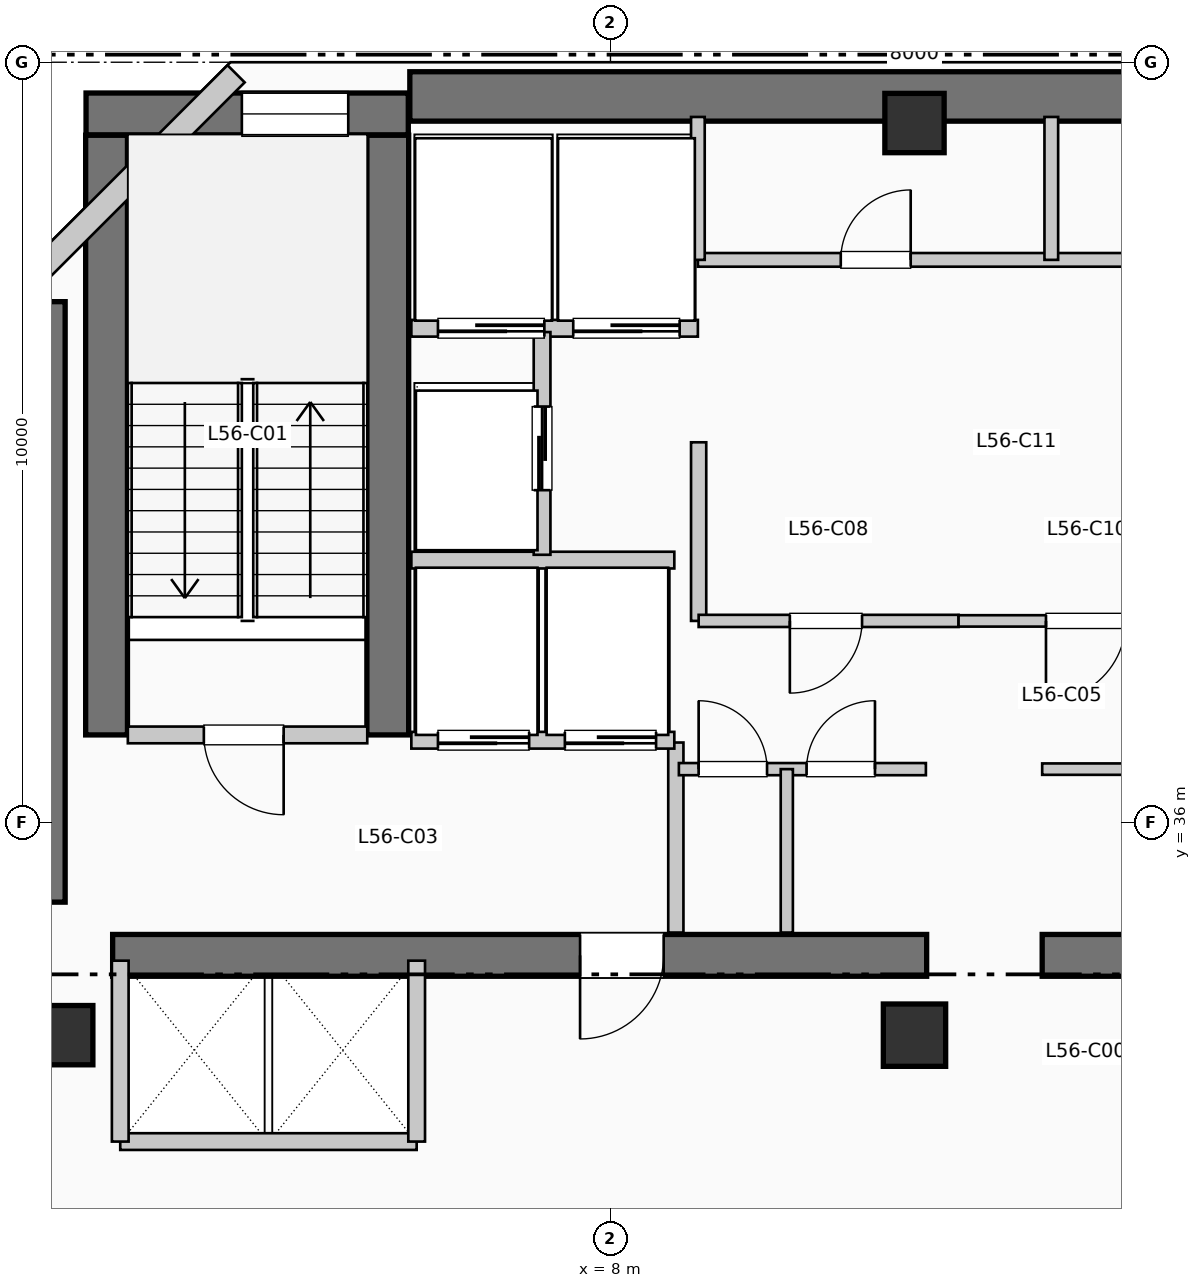
"""IFC4 building model, lengths in metres.
Left out: names, types, materials, properties, quantities, classifications, styles, units other than length and angle.
Written with IfcOpenShell. Run it as: python <this file> out.ifc"""

import sys

from ifc_helpers import new_model, si_unit, direction, frame, frame_2d, origin, origin_2d, place, context, subcontext, project, spatial, rectangle, extrude, element, fill, save


model = new_model("IFC4")
c1 = context("Model", 3, precision=1e-05, world=origin(), true_north=direction((0.0, 1.0)))
c2 = subcontext(c1, "Body", "Model", "MODEL_VIEW")
j1 = project(units=[si_unit("LENGTHUNIT", "METRE"), si_unit("PLANEANGLEUNIT", "RADIAN")], contexts=[c1])
p1 = place(None, origin())
s1 = spatial("IfcSite", under=j1, at=p1, CompositionType="ELEMENT")
p2 = place(p1, origin())
s2 = spatial("IfcBuilding", under=s1, at=p2, CompositionType="ELEMENT")
p3 = place(p2, frame((0.0, 0.0, 231.66)))
s3 = spatial("IfcBuildingStorey", under=s2, at=p3, CompositionType="ELEMENT", Elevation=231.66)
p4 = place(p3, frame((5.36, 45.55, 0.0), z_axis=(0.0, 0.0, 1.0), x_axis=(1.0, 0.0, 0.0)))
e1 = element("IfcWall", 1, at=p4, inside=s3, PredefinedType="SHEAR", context=c2, shape_type="SweptSolid", body=[
    extrude(rectangle(XDim=13.98, YDim=0.65, at=frame_2d((6.99, 0.0))), origin(), (0.0, 0.0, 1.0), 3.96),
])
p5 = place(p3, frame((0.5, 34.95, 0.0), z_axis=(0.0, 0.0, 1.0), x_axis=(0.0, 1.0, 0.0)))
e2 = element("IfcWall", 2, at=p5, inside=s3, PredefinedType="SHEAR", context=c2, shape_type="SweptSolid", body=[
    extrude(rectangle(XDim=7.9, YDim=0.65, at=frame_2d((3.95, 0.0))), origin(), (0.0, 0.0, 1.0), 3.96),
])
p6 = place(p3, frame((1.45, 34.25, 0.0), z_axis=(0.0, 0.0, 1.0), x_axis=(1.0, 0.0, 0.0)))
e3 = element("IfcWall", 3, at=p6, inside=s3, PredefinedType="SHEAR", context=c2, shape_type="SweptSolid", body=[
    extrude(rectangle(XDim=10.71, YDim=0.55, at=frame_2d((5.355, 0.0))), origin(), (0.0, 0.0, 1.0), 3.96),
])
p7 = place(p6, frame((7.25, 0.0, 0.0), z_axis=(0.0, 0.0, 1.0), x_axis=(-1.0, 0.0, 0.0)))
e4 = element("IfcOpeningElement", 4, at=p7, cuts=e3, PredefinedType="OPENING", context=c2, shape_type="SweptSolid", body=[
    extrude(rectangle(XDim=1.1, YDim=2.15, at=frame_2d((0.55, 1.075))), frame((0.0, 0.285, 0.0), z_axis=(0.0, -1.0, 0.0), x_axis=(1.0, 0.0, 0.0)), (0.0, 0.0, 1.0), 0.57),
])
p8 = place(p3, frame((13.68, 34.25, 0.0), z_axis=(0.0, 0.0, 1.0), x_axis=(1.0, 0.0, 0.0)))
e5 = element("IfcWall", 5, at=p8, inside=s3, PredefinedType="SHEAR", context=c2, shape_type="SweptSolid", body=[
    extrude(rectangle(XDim=6.12, YDim=0.55, at=frame_2d((3.06, 0.0))), origin(), (0.0, 0.0, 1.0), 3.96),
])
for number, where, z_axis, x_axis in (
    (6, (1.37, 37.15, 0.0), (0.0, 0.0, 1.0), (0.0, 1.0, 0.0)),
    (7, (5.07, 37.15, 0.0), (0.0, 0.0, 1.0), (0.0, 1.0, 0.0)),
):
    element("IfcWall", number, at=place(p3, frame(where, z_axis=z_axis, x_axis=x_axis)), inside=s3, PredefinedType="SHEAR", context=c2, shape_type="SweptSolid", body=[
        extrude(rectangle(XDim=7.89, YDim=0.55, at=frame_2d((3.945, 0.0))), origin(), (0.0, 0.0, 1.0), 3.96),
    ])
p9 = place(p3, frame((1.1, 45.32, 0.0), z_axis=(0.0, 0.0, 1.0), x_axis=(1.0, 0.0, 0.0)))
e8 = element("IfcWall", 8, at=p9, inside=s3, PredefinedType="SHEAR", context=c2, shape_type="SweptSolid", body=[
    extrude(rectangle(XDim=4.24, YDim=0.55, at=frame_2d((2.12, 0.0))), origin(), (0.0, 0.0, 1.0), 3.96),
])
p10 = place(p9, frame((2.05, 0.0, 1.05)))
e9 = element("IfcOpeningElement", 9, at=p10, cuts=e8, PredefinedType="OPENING", context=c2, shape_type="SweptSolid", body=[
    extrude(rectangle(XDim=1.4, YDim=1.8, at=frame_2d((0.7, 0.9))), frame((0.0, 0.285, 0.0), z_axis=(0.0, -1.0, 0.0), x_axis=(1.0, 0.0, 0.0)), (0.0, 0.0, 1.0), 0.57),
])
p11 = place(p3, frame((0.8, 33.2, 0.0), z_axis=(0.0, 0.0, 1.0), x_axis=(1.0, 0.0, 0.0)))
e10 = element("IfcColumn", 10, at=p11, inside=s3, PredefinedType="COLUMN", context=c2, shape_type="SweptSolid", body=[
    extrude(rectangle(XDim=0.78, YDim=0.78, at=origin_2d()), origin(), (0.0, 0.0, 1.0), 3.96),
])
p12 = place(p3, frame((12.0, 33.2, 0.0), z_axis=(0.0, 0.0, 1.0), x_axis=(1.0, 0.0, 0.0)))
e11 = element("IfcColumn", 11, at=p12, inside=s3, PredefinedType="COLUMN", context=c2, shape_type="SweptSolid", body=[
    extrude(rectangle(XDim=0.82, YDim=0.82, at=origin_2d()), origin(), (0.0, 0.0, 1.0), 3.96),
])
p13 = place(p3, frame((12.0, 45.2, 0.0), z_axis=(0.0, 0.0, 1.0), x_axis=(1.0, 0.0, 0.0)))
e12 = element("IfcColumn", 12, at=p13, inside=s3, PredefinedType="COLUMN", context=c2, shape_type="SweptSolid", body=[
    extrude(rectangle(XDim=0.78, YDim=0.78, at=origin_2d()), origin(), (0.0, 0.0, 1.0), 3.96),
])
p14 = place(p3, frame((3.074, 45.848, 0.0), z_axis=(0.0, 0.0, 1.0), x_axis=(-0.707106781187, -0.707106781187, 0.0)))
e13 = element("IfcWall", 13, at=p14, inside=s3, PredefinedType="SOLIDWALL", context=c2, shape_type="SweptSolid", body=[
    extrude(rectangle(XDim=4.133, YDim=0.32, at=frame_2d((2.066, 0.0))), origin(), (0.0, 0.0, 1.0), 3.71),
])
p15 = place(p3, frame((1.65, 37.15, 0.0), z_axis=(0.0, 0.0, 1.0), x_axis=(1.0, 0.0, 0.0)))
e14 = element("IfcWall", 14, at=p15, inside=s3, PredefinedType="PARTITIONING", context=c2, shape_type="SweptSolid", body=[
    extrude(rectangle(XDim=3.15, YDim=0.22, at=frame_2d((1.575, 0.0))), origin(), (0.0, 0.0, 1.0), 3.71),
])
p16 = place(p15, frame((2.05, 0.0, 0.0), z_axis=(0.0, 0.0, 1.0), x_axis=(-1.0, 0.0, 0.0)))
e15 = element("IfcOpeningElement", 15, at=p16, cuts=e14, PredefinedType="OPENING", context=c2, shape_type="SweptSolid", body=[
    extrude(rectangle(XDim=1.05, YDim=2.15, at=frame_2d((0.525, 1.075))), frame((0.0, 0.12, 0.0), z_axis=(0.0, -1.0, 0.0), x_axis=(1.0, 0.0, 0.0)), (0.0, 0.0, 1.0), 0.24),
])
p17 = place(p3, frame((8.86, 34.55, 0.0), z_axis=(0.0, 0.0, 1.0), x_axis=(0.0, 1.0, 0.0)))
e16 = element("IfcWall", 16, at=p17, inside=s3, PredefinedType="PARTITIONING", context=c2, shape_type="SweptSolid", body=[
    extrude(rectangle(XDim=2.5, YDim=0.2, at=frame_2d((1.25, 0.0))), origin(), (0.0, 0.0, 1.0), 3.71),
])
p18 = place(p3, frame((5.38, 37.08, 0.0), z_axis=(0.0, 0.0, 1.0), x_axis=(1.0, 0.0, 0.0)))
e17 = element("IfcWall", 17, at=p18, inside=s3, PredefinedType="PARTITIONING", context=c2, shape_type="SweptSolid", body=[
    extrude(rectangle(XDim=3.46, YDim=0.22, at=frame_2d((1.73, 0.0))), origin(), (0.0, 0.0, 1.0), 3.71),
])
p19 = place(p18, frame((1.55, 0.0, 0.0), z_axis=(0.0, 0.0, 1.0), x_axis=(-1.0, 0.0, 0.0)))
e18 = element("IfcOpeningElement", 18, at=p19, cuts=e17, PredefinedType="OPENING", context=c2, shape_type="SweptSolid", body=[
    extrude(rectangle(XDim=1.2, YDim=2.2, at=frame_2d((0.6, 1.1))), frame((0.0, 0.12, 0.0), z_axis=(0.0, -1.0, 0.0), x_axis=(1.0, 0.0, 0.0)), (0.0, 0.0, 1.0), 0.24),
])
p20 = place(p18, frame((3.22, 0.0, 0.0), z_axis=(0.0, 0.0, 1.0), x_axis=(-1.0, 0.0, 0.0)))
e19 = element("IfcOpeningElement", 19, at=p20, cuts=e17, PredefinedType="OPENING", context=c2, shape_type="SweptSolid", body=[
    extrude(rectangle(XDim=1.2, YDim=2.2, at=frame_2d((0.6, 1.1))), frame((0.0, 0.12, 0.0), z_axis=(0.0, -1.0, 0.0), x_axis=(1.0, 0.0, 0.0)), (0.0, 0.0, 1.0), 0.24),
])
p21 = place(p3, frame((5.38, 39.45, 0.0), z_axis=(0.0, 0.0, 1.0), x_axis=(1.0, 0.0, 0.0)))
e20 = element("IfcWall", 20, at=p21, inside=s3, PredefinedType="PARTITIONING", context=c2, shape_type="SweptSolid", body=[
    extrude(rectangle(XDim=3.46, YDim=0.22, at=frame_2d((1.73, 0.0))), origin(), (0.0, 0.0, 1.0), 3.71),
])
p22 = place(p3, frame((5.38, 42.5, 0.0), z_axis=(0.0, 0.0, 1.0), x_axis=(1.0, 0.0, 0.0)))
e21 = element("IfcWall", 21, at=p22, inside=s3, PredefinedType="PARTITIONING", context=c2, shape_type="SweptSolid", body=[
    extrude(rectangle(XDim=3.77, YDim=0.22, at=frame_2d((1.885, 0.0))), origin(), (0.0, 0.0, 1.0), 3.71),
])
p23 = place(p22, frame((1.75, 0.0, 0.0), z_axis=(0.0, 0.0, 1.0), x_axis=(-1.0, 0.0, 0.0)))
e22 = element("IfcOpeningElement", 22, at=p23, cuts=e21, PredefinedType="OPENING", context=c2, shape_type="SweptSolid", body=[
    extrude(rectangle(XDim=1.4, YDim=2.2, at=frame_2d((0.7, 1.1))), frame((0.0, 0.12, 0.0), z_axis=(0.0, -1.0, 0.0), x_axis=(1.0, 0.0, 0.0)), (0.0, 0.0, 1.0), 0.24),
])
p24 = place(p22, frame((3.53, 0.0, 0.0), z_axis=(0.0, 0.0, 1.0), x_axis=(-1.0, 0.0, 0.0)))
e23 = element("IfcOpeningElement", 23, at=p24, cuts=e21, PredefinedType="OPENING", context=c2, shape_type="SweptSolid", body=[
    extrude(rectangle(XDim=1.4, YDim=2.2, at=frame_2d((0.7, 1.1))), frame((0.0, 0.12, 0.0), z_axis=(0.0, -1.0, 0.0), x_axis=(1.0, 0.0, 0.0)), (0.0, 0.0, 1.0), 0.24),
])
p25 = place(p3, frame((7.1, 39.52, 0.0), z_axis=(0.0, 0.0, 1.0), x_axis=(0.0, 1.0, 0.0)))
e24 = element("IfcWall", 24, at=p25, inside=s3, PredefinedType="PARTITIONING", context=c2, shape_type="SweptSolid", body=[
    extrude(rectangle(XDim=2.93, YDim=0.22, at=frame_2d((1.465, 0.0))), origin(), (0.0, 0.0, 1.0), 3.71),
])
p26 = place(p25, frame((0.85, 0.0, 0.0)))
e25 = element("IfcOpeningElement", 25, at=p26, cuts=e24, PredefinedType="OPENING", context=c2, shape_type="SweptSolid", body=[
    extrude(rectangle(XDim=1.1, YDim=2.2, at=frame_2d((0.55, 1.1))), frame((0.0, 0.12, 0.0), z_axis=(0.0, -1.0, 0.0), x_axis=(1.0, 0.0, 0.0)), (0.0, 0.0, 1.0), 0.24),
])
p27 = place(p3, frame((1.55, 31.8, 0.0), z_axis=(0.0, 0.0, 1.0), x_axis=(1.0, 0.0, 0.0)))
e26 = element("IfcWall", 26, at=p27, inside=s3, PredefinedType="PARTITIONING", context=c2, shape_type="SweptSolid", body=[
    extrude(rectangle(XDim=3.9, YDim=0.22, at=frame_2d((1.95, 0.0))), origin(), (0.0, 0.0, 1.0), 3.71),
])
for number, where, z_axis, x_axis in (
    (27, (1.55, 31.8, 0.0), (0.0, 0.0, 1.0), (0.0, 1.0, 0.0)),
    (28, (5.45, 31.8, 0.0), (0.0, 0.0, 1.0), (0.0, 1.0, 0.0)),
):
    element("IfcWall", number, at=place(p3, frame(where, z_axis=z_axis, x_axis=x_axis)), inside=s3, PredefinedType="PARTITIONING", context=c2, shape_type="SweptSolid", body=[
        extrude(rectangle(XDim=2.38, YDim=0.22, at=frame_2d((1.19, 0.0))), origin(), (0.0, 0.0, 1.0), 3.71),
    ])
p28 = place(p3, frame((9.16, 38.65, 0.0), z_axis=(0.0, 0.0, 1.0), x_axis=(0.0, 1.0, 0.0)))
e29 = element("IfcWall", 29, at=p28, inside=s3, PredefinedType="PARTITIONING", context=c2, shape_type="SweptSolid", body=[
    extrude(rectangle(XDim=2.35, YDim=0.2, at=frame_2d((1.175, 0.0))), origin(), (0.0, 0.0, 1.0), 3.71),
])
p29 = place(p3, frame((8.9, 36.7, 0.0), z_axis=(0.0, 0.0, 1.0), x_axis=(1.0, 0.0, 0.0)))
e30 = element("IfcWall", 30, at=p29, inside=s3, PredefinedType="PARTITIONING", context=c2, shape_type="SweptSolid", body=[
    extrude(rectangle(XDim=3.25, YDim=0.16, at=frame_2d((1.625, 0.0))), origin(), (0.0, 0.0, 1.0), 3.71),
])
p30 = place(p29, frame((0.26, 0.0, 0.0)))
e31 = element("IfcOpeningElement", 31, at=p30, cuts=e30, PredefinedType="OPENING", context=c2, shape_type="SweptSolid", body=[
    extrude(rectangle(XDim=0.9, YDim=2.15, at=frame_2d((0.45, 1.075))), frame((0.0, 0.09, 0.0), z_axis=(0.0, -1.0, 0.0), x_axis=(1.0, 0.0, 0.0)), (0.0, 0.0, 1.0), 0.18),
])
p31 = place(p29, frame((1.68, 0.0, 0.0)))
e32 = element("IfcOpeningElement", 32, at=p31, cuts=e30, PredefinedType="OPENING", context=c2, shape_type="SweptSolid", body=[
    extrude(rectangle(XDim=0.9, YDim=2.15, at=frame_2d((0.45, 1.075))), frame((0.0, 0.09, 0.0), z_axis=(0.0, -1.0, 0.0), x_axis=(1.0, 0.0, 0.0)), (0.0, 0.0, 1.0), 0.18),
])
p32 = place(p3, frame((10.32, 34.55, 0.0), z_axis=(0.0, 0.0, 1.0), x_axis=(0.0, 1.0, 0.0)))
e33 = element("IfcWall", 33, at=p32, inside=s3, PredefinedType="PARTITIONING", context=c2, shape_type="SweptSolid", body=[
    extrude(rectangle(XDim=2.15, YDim=0.16, at=frame_2d((1.075, 0.0))), origin(), (0.0, 0.0, 1.0), 3.71),
])
p33 = place(p3, frame((9.16, 38.65, 0.0), z_axis=(0.0, 0.0, 1.0), x_axis=(1.0, 0.0, 0.0)))
e34 = element("IfcWall", 34, at=p33, inside=s3, PredefinedType="PARTITIONING", context=c2, shape_type="SweptSolid", body=[
    extrude(rectangle(XDim=3.42, YDim=0.16, at=frame_2d((1.71, 0.0))), origin(), (0.0, 0.0, 1.0), 3.71),
])
p34 = place(p33, frame((2.15, 0.0, 0.0), z_axis=(0.0, 0.0, 1.0), x_axis=(-1.0, 0.0, 0.0)))
e35 = element("IfcOpeningElement", 35, at=p34, cuts=e34, PredefinedType="OPENING", context=c2, shape_type="SweptSolid", body=[
    extrude(rectangle(XDim=0.95, YDim=2.15, at=frame_2d((0.475, 1.075))), frame((0.0, 0.09, 0.0), z_axis=(0.0, -1.0, 0.0), x_axis=(1.0, 0.0, 0.0)), (0.0, 0.0, 1.0), 0.18),
])
p35 = place(p3, frame((13.68, 36.7, 0.0), z_axis=(0.0, 0.0, 1.0), x_axis=(1.0, 0.0, 0.0)))
e36 = element("IfcWall", 36, at=p35, inside=s3, PredefinedType="PARTITIONING", context=c2, shape_type="SweptSolid", body=[
    extrude(rectangle(XDim=3.28, YDim=0.15, at=frame_2d((1.64, 0.0))), origin(), (0.0, 0.0, 1.0), 3.71),
])
p36 = place(p35, frame((1.15, 0.0, 0.0)))
e37 = element("IfcOpeningElement", 37, at=p36, cuts=e36, PredefinedType="OPENING", context=c2, shape_type="SweptSolid", body=[
    extrude(rectangle(XDim=0.95, YDim=2.15, at=frame_2d((0.475, 1.075))), frame((0.0, 0.085, 0.0), z_axis=(0.0, -1.0, 0.0), x_axis=(1.0, 0.0, 0.0)), (0.0, 0.0, 1.0), 0.17),
])
p37 = place(p3, frame((12.58, 38.65, 0.0), z_axis=(0.0, 0.0, 1.0), x_axis=(1.0, 0.0, 0.0)))
e38 = element("IfcWall", 38, at=p37, inside=s3, PredefinedType="PARTITIONING", context=c2, shape_type="SweptSolid", body=[
    extrude(rectangle(XDim=3.38, YDim=0.15, at=frame_2d((1.69, 0.0))), origin(), (0.0, 0.0, 1.0), 3.71),
])
p38 = place(p37, frame((2.2, 0.0, 0.0), z_axis=(0.0, 0.0, 1.0), x_axis=(-1.0, 0.0, 0.0)))
e39 = element("IfcOpeningElement", 39, at=p38, cuts=e38, PredefinedType="OPENING", context=c2, shape_type="SweptSolid", body=[
    extrude(rectangle(XDim=1.05, YDim=2.15, at=frame_2d((0.525, 1.075))), frame((0.0, 0.085, 0.0), z_axis=(0.0, -1.0, 0.0), x_axis=(1.0, 0.0, 0.0)), (0.0, 0.0, 1.0), 0.17),
])
p39 = place(p3, frame((9.15, 43.4, 0.0), z_axis=(0.0, 0.0, 1.0), x_axis=(1.0, 0.0, 0.0)))
e40 = element("IfcWall", 40, at=p39, inside=s3, PredefinedType="PLUMBINGWALL", context=c2, shape_type="SweptSolid", body=[
    extrude(rectangle(XDim=9.33, YDim=0.18, at=frame_2d((4.665, 0.0))), origin(), (0.0, 0.0, 1.0), 3.71),
])
p40 = place(p39, frame((1.88, 0.0, 0.0)))
e41 = element("IfcOpeningElement", 41, at=p40, cuts=e40, PredefinedType="OPENING", context=c2, shape_type="SweptSolid", body=[
    extrude(rectangle(XDim=0.92, YDim=2.1, at=frame_2d((0.46, 1.05))), frame((0.0, 0.1, 0.0), z_axis=(0.0, -1.0, 0.0), x_axis=(1.0, 0.0, 0.0)), (0.0, 0.0, 1.0), 0.2),
])
p41 = place(p39, frame((6.515, 0.0, 0.0)))
e42 = element("IfcOpeningElement", 42, at=p41, cuts=e40, PredefinedType="OPENING", context=c2, shape_type="SweptSolid", body=[
    extrude(rectangle(XDim=0.92, YDim=2.1, at=frame_2d((0.46, 1.05))), frame((0.0, 0.1, 0.0), z_axis=(0.0, -1.0, 0.0), x_axis=(1.0, 0.0, 0.0)), (0.0, 0.0, 1.0), 0.2),
])
for number, where, z_axis, x_axis in (
    (43, (9.15, 43.4, 0.0), (0.0, 0.0, 1.0), (0.0, 1.0, 0.0)),
    (44, (13.8, 43.4, 0.0), (0.0, 0.0, 1.0), (0.0, 1.0, 0.0)),
):
    element("IfcWall", number, at=place(p3, frame(where, z_axis=z_axis, x_axis=x_axis)), inside=s3, PredefinedType="PLUMBINGWALL", context=c2, shape_type="SweptSolid", body=[
        extrude(rectangle(XDim=1.88, YDim=0.18, at=frame_2d((0.94, 0.0))), origin(), (0.0, 0.0, 1.0), 3.71),
    ])
p42 = place(p10, origin())
e45 = element("IfcWindow", 45, at=p42, inside=s3, PartitioningType="SINGLE_PANEL", PredefinedType="WINDOW", context=c2, shape_type="SweptSolid", body=[
    extrude(rectangle(XDim=1.4, YDim=1.8, at=frame_2d((0.7, 0.9))), frame((0.0, 0.03, 0.0), z_axis=(0.0, -1.0, 0.0), x_axis=(1.0, 0.0, 0.0)), (0.0, 0.0, 1.0), 0.06),
])
fill(e9, e45)
p43 = place(p16, origin())
e46 = element("IfcDoor", 46, at=p43, inside=s3, OperationType="SINGLE_SWING_RIGHT", PredefinedType="DOOR", context=c2, shape_type="SweptSolid", body=[
    extrude(rectangle(XDim=1.05, YDim=2.15, at=frame_2d((0.525, 1.075))), frame((0.0, 0.025, 0.0), z_axis=(0.0, -1.0, 0.0), x_axis=(1.0, 0.0, 0.0)), (0.0, 0.0, 1.0), 0.05),
])
fill(e15, e46)
p44 = place(p7, origin())
e47 = element("IfcDoor", 47, at=p44, inside=s3, OperationType="SINGLE_SWING_LEFT", PredefinedType="DOOR", context=c2, shape_type="SweptSolid", body=[
    extrude(rectangle(XDim=1.1, YDim=2.15, at=frame_2d((0.55, 1.075))), frame((0.0, 0.025, 0.0), z_axis=(0.0, -1.0, 0.0), x_axis=(1.0, 0.0, 0.0)), (0.0, 0.0, 1.0), 0.05),
])
fill(e4, e47)
p45 = place(p19, origin())
e48 = element("IfcDoor", 48, at=p45, inside=s3, OperationType="SLIDING_TO_RIGHT", PredefinedType="DOOR", context=c2, shape_type="SweptSolid", body=[
    extrude(rectangle(XDim=1.2, YDim=2.2, at=frame_2d((0.6, 1.1))), frame((0.0, 0.025, 0.0), z_axis=(0.0, -1.0, 0.0), x_axis=(1.0, 0.0, 0.0)), (0.0, 0.0, 1.0), 0.05),
])
fill(e18, e48)
p46 = place(p20, origin())
e49 = element("IfcDoor", 49, at=p46, inside=s3, OperationType="SLIDING_TO_RIGHT", PredefinedType="DOOR", context=c2, shape_type="SweptSolid", body=[
    extrude(rectangle(XDim=1.2, YDim=2.2, at=frame_2d((0.6, 1.1))), frame((0.0, 0.025, 0.0), z_axis=(0.0, -1.0, 0.0), x_axis=(1.0, 0.0, 0.0)), (0.0, 0.0, 1.0), 0.05),
])
fill(e19, e49)
p47 = place(p23, origin())
e50 = element("IfcDoor", 50, at=p47, inside=s3, OperationType="SLIDING_TO_LEFT", PredefinedType="DOOR", context=c2, shape_type="SweptSolid", body=[
    extrude(rectangle(XDim=1.4, YDim=2.2, at=frame_2d((0.7, 1.1))), frame((0.0, 0.025, 0.0), z_axis=(0.0, -1.0, 0.0), x_axis=(1.0, 0.0, 0.0)), (0.0, 0.0, 1.0), 0.05),
])
fill(e22, e50)
p48 = place(p24, origin())
e51 = element("IfcDoor", 51, at=p48, inside=s3, OperationType="SLIDING_TO_LEFT", PredefinedType="DOOR", context=c2, shape_type="SweptSolid", body=[
    extrude(rectangle(XDim=1.4, YDim=2.2, at=frame_2d((0.7, 1.1))), frame((0.0, 0.025, 0.0), z_axis=(0.0, -1.0, 0.0), x_axis=(1.0, 0.0, 0.0)), (0.0, 0.0, 1.0), 0.05),
])
fill(e23, e51)
p49 = place(p26, origin())
e52 = element("IfcDoor", 52, at=p49, inside=s3, OperationType="SLIDING_TO_LEFT", PredefinedType="DOOR", context=c2, shape_type="SweptSolid", body=[
    extrude(rectangle(XDim=1.1, YDim=2.2, at=frame_2d((0.55, 1.1))), frame((0.0, 0.025, 0.0), z_axis=(0.0, -1.0, 0.0), x_axis=(1.0, 0.0, 0.0)), (0.0, 0.0, 1.0), 0.05),
])
fill(e25, e52)
p50 = place(p30, origin())
e53 = element("IfcDoor", 53, at=p50, inside=s3, OperationType="SINGLE_SWING_LEFT", PredefinedType="DOOR", context=c2, shape_type="SweptSolid", body=[
    extrude(rectangle(XDim=0.9, YDim=2.15, at=frame_2d((0.45, 1.075))), frame((0.0, 0.025, 0.0), z_axis=(0.0, -1.0, 0.0), x_axis=(1.0, 0.0, 0.0)), (0.0, 0.0, 1.0), 0.05),
])
fill(e31, e53)
p51 = place(p31, origin())
e54 = element("IfcDoor", 54, at=p51, inside=s3, OperationType="SINGLE_SWING_RIGHT", PredefinedType="DOOR", context=c2, shape_type="SweptSolid", body=[
    extrude(rectangle(XDim=0.9, YDim=2.15, at=frame_2d((0.45, 1.075))), frame((0.0, 0.025, 0.0), z_axis=(0.0, -1.0, 0.0), x_axis=(1.0, 0.0, 0.0)), (0.0, 0.0, 1.0), 0.05),
])
fill(e32, e54)
p52 = place(p34, origin())
e55 = element("IfcDoor", 55, at=p52, inside=s3, OperationType="SINGLE_SWING_LEFT", PredefinedType="DOOR", context=c2, shape_type="SweptSolid", body=[
    extrude(rectangle(XDim=0.95, YDim=2.15, at=frame_2d((0.475, 1.075))), frame((0.0, 0.025, 0.0), z_axis=(0.0, -1.0, 0.0), x_axis=(1.0, 0.0, 0.0)), (0.0, 0.0, 1.0), 0.05),
])
fill(e35, e55)
p53 = place(p38, origin())
e56 = element("IfcDoor", 56, at=p53, inside=s3, OperationType="SINGLE_SWING_LEFT", PredefinedType="DOOR", context=c2, shape_type="SweptSolid", body=[
    extrude(rectangle(XDim=1.05, YDim=2.15, at=frame_2d((0.525, 1.075))), frame((0.0, 0.025, 0.0), z_axis=(0.0, -1.0, 0.0), x_axis=(1.0, 0.0, 0.0)), (0.0, 0.0, 1.0), 0.05),
])
fill(e39, e56)
p54 = place(p40, origin())
e57 = element("IfcDoor", 57, at=p54, inside=s3, OperationType="SINGLE_SWING_RIGHT", PredefinedType="DOOR", context=c2, shape_type="SweptSolid", body=[
    extrude(rectangle(XDim=0.92, YDim=2.1, at=frame_2d((0.46, 1.05))), frame((0.0, 0.025, 0.0), z_axis=(0.0, -1.0, 0.0), x_axis=(1.0, 0.0, 0.0)), (0.0, 0.0, 1.0), 0.05),
])
fill(e41, e57)
save(model, sys.argv[1])
